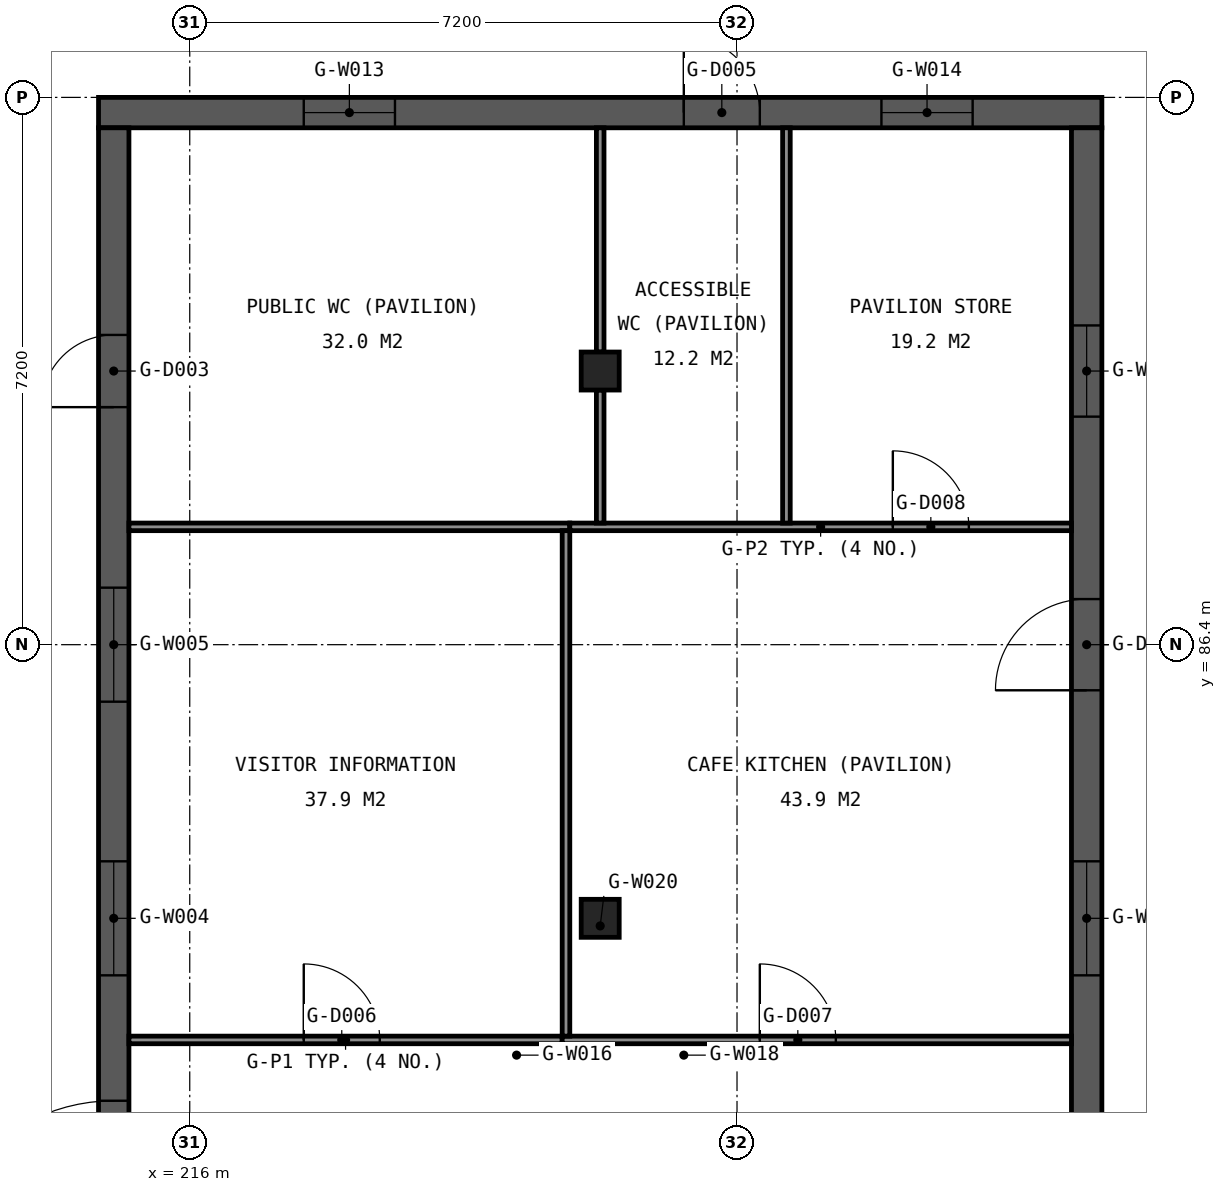
"""IFC4 building model, lengths in metres.
Left out: names, types, materials, properties, quantities, classifications, styles, units other than length and angle.
Written with IfcOpenShell. Run it as: python <this file> out.ifc"""

import sys

from ifc_helpers import new_model, si_unit, direction, frame, frame_2d, origin, origin_2d, place, context, subcontext, project, spatial, rectangle, extrude, element, fill, save


model = new_model("IFC4")
c1 = context("Model", 3, precision=1e-05, world=origin(), true_north=direction((0.0, 1.0)))
c2 = subcontext(c1, "Body", "Model", "MODEL_VIEW")
j1 = project(units=[si_unit("LENGTHUNIT", "METRE"), si_unit("PLANEANGLEUNIT", "RADIAN")], contexts=[c1])
p1 = place(None, origin())
s1 = spatial("IfcSite", under=j1, at=p1, CompositionType="ELEMENT")
p2 = place(p1, origin())
s2 = spatial("IfcBuilding", under=s1, at=p2, CompositionType="ELEMENT")
p3 = place(p2, frame((0.0, 0.0, 4.8)))
s3 = spatial("IfcBuildingStorey", under=s2, at=p3, CompositionType="ELEMENT", Elevation=4.8)
p4 = place(p3, frame((214.8, 93.4, -1.2), z_axis=(0.0, 0.0, 1.0), x_axis=(1.0, 0.0, 0.0)))
e1 = element("IfcWall", 1, at=p4, inside=s3, PredefinedType="SOLIDWALL", context=c2, shape_type="SweptSolid", body=[
    extrude(rectangle(XDim=13.2, YDim=0.4, at=frame_2d((6.6, 0.0))), origin(), (0.0, 0.0, 1.0), 7.2),
])
p5 = place(p4, frame((7.7, 0.0, 1.2)))
e2 = element("IfcOpeningElement", 2, at=p5, cuts=e1, PredefinedType="OPENING", context=c2, shape_type="SweptSolid", body=[
    extrude(rectangle(XDim=1.0, YDim=2.1, at=frame_2d((0.5, 1.05))), frame((0.0, 0.21, 0.0), z_axis=(0.0, -1.0, 0.0), x_axis=(1.0, 0.0, 0.0)), (0.0, 0.0, 1.0), 0.42),
])
p6 = place(p4, frame((2.7, 0.0, 2.7)))
e3 = element("IfcOpeningElement", 3, at=p6, cuts=e1, PredefinedType="OPENING", context=c2, shape_type="SweptSolid", body=[
    extrude(rectangle(XDim=1.2, YDim=1.2, at=frame_2d((0.6, 0.6))), frame((0.0, 0.21, 0.0), z_axis=(0.0, -1.0, 0.0), x_axis=(1.0, 0.0, 0.0)), (0.0, 0.0, 1.0), 0.42),
])
p7 = place(p4, frame((10.3, 0.0, 2.7)))
e4 = element("IfcOpeningElement", 4, at=p7, cuts=e1, PredefinedType="OPENING", context=c2, shape_type="SweptSolid", body=[
    extrude(rectangle(XDim=1.2, YDim=1.2, at=frame_2d((0.6, 0.6))), frame((0.0, 0.21, 0.0), z_axis=(0.0, -1.0, 0.0), x_axis=(1.0, 0.0, 0.0)), (0.0, 0.0, 1.0), 0.42),
])
p8 = place(p3, frame((215.0, 65.2, -1.2), z_axis=(0.0, 0.0, 1.0), x_axis=(0.0, 1.0, 0.0)))
e5 = element("IfcWall", 5, at=p8, inside=s3, PredefinedType="SOLIDWALL", context=c2, shape_type="SweptSolid", body=[
    extrude(rectangle(XDim=28.0, YDim=0.4, at=frame_2d((14.0, 0.0))), origin(), (0.0, 0.0, 1.0), 7.2),
])
p9 = place(p8, frame((12.8, 0.0, 1.2)))
e6 = element("IfcOpeningElement", 6, at=p9, cuts=e5, PredefinedType="OPENING", context=c2, shape_type="SweptSolid", body=[
    extrude(rectangle(XDim=2.4, YDim=3.0, at=frame_2d((1.2, 1.5))), frame((0.0, 0.21, 0.0), z_axis=(0.0, -1.0, 0.0), x_axis=(1.0, 0.0, 0.0)), (0.0, 0.0, 1.0), 0.42),
])
p10 = place(p8, frame((24.325, 0.0, 1.2)))
e7 = element("IfcOpeningElement", 7, at=p10, cuts=e5, PredefinedType="OPENING", context=c2, shape_type="SweptSolid", body=[
    extrude(rectangle(XDim=0.95, YDim=2.1, at=frame_2d((0.475, 1.05))), frame((0.0, 0.21, 0.0), z_axis=(0.0, -1.0, 0.0), x_axis=(1.0, 0.0, 0.0)), (0.0, 0.0, 1.0), 0.42),
])
p11 = place(p8, frame((2.45, 0.0, 2.1)))
e8 = element("IfcOpeningElement", 8, at=p11, cuts=e5, PredefinedType="OPENING", context=c2, shape_type="SweptSolid", body=[
    extrude(rectangle(XDim=1.5, YDim=3.3, at=frame_2d((0.75, 1.65))), frame((0.0, 0.21, 0.0), z_axis=(0.0, -1.0, 0.0), x_axis=(1.0, 0.0, 0.0)), (0.0, 0.0, 1.0), 0.42),
])
p12 = place(p8, frame((6.05, 0.0, 2.1)))
e9 = element("IfcOpeningElement", 9, at=p12, cuts=e5, PredefinedType="OPENING", context=c2, shape_type="SweptSolid", body=[
    extrude(rectangle(XDim=1.5, YDim=3.3, at=frame_2d((0.75, 1.65))), frame((0.0, 0.21, 0.0), z_axis=(0.0, -1.0, 0.0), x_axis=(1.0, 0.0, 0.0)), (0.0, 0.0, 1.0), 0.42),
])
p13 = place(p8, frame((9.65, 0.0, 2.1)))
e10 = element("IfcOpeningElement", 10, at=p13, cuts=e5, PredefinedType="OPENING", context=c2, shape_type="SweptSolid", body=[
    extrude(rectangle(XDim=1.5, YDim=3.3, at=frame_2d((0.75, 1.65))), frame((0.0, 0.21, 0.0), z_axis=(0.0, -1.0, 0.0), x_axis=(1.0, 0.0, 0.0)), (0.0, 0.0, 1.0), 0.42),
])
p14 = place(p8, frame((16.85, 0.0, 2.1)))
e11 = element("IfcOpeningElement", 11, at=p14, cuts=e5, PredefinedType="OPENING", context=c2, shape_type="SweptSolid", body=[
    extrude(rectangle(XDim=1.5, YDim=3.3, at=frame_2d((0.75, 1.65))), frame((0.0, 0.21, 0.0), z_axis=(0.0, -1.0, 0.0), x_axis=(1.0, 0.0, 0.0)), (0.0, 0.0, 1.0), 0.42),
])
p15 = place(p8, frame((20.45, 0.0, 2.1)))
e12 = element("IfcOpeningElement", 12, at=p15, cuts=e5, PredefinedType="OPENING", context=c2, shape_type="SweptSolid", body=[
    extrude(rectangle(XDim=1.5, YDim=3.3, at=frame_2d((0.75, 1.65))), frame((0.0, 0.21, 0.0), z_axis=(0.0, -1.0, 0.0), x_axis=(1.0, 0.0, 0.0)), (0.0, 0.0, 1.0), 0.42),
])
p16 = place(p3, frame((227.8, 65.2, -1.2), z_axis=(0.0, 0.0, 1.0), x_axis=(0.0, 1.0, 0.0)))
e13 = element("IfcWall", 13, at=p16, inside=s3, PredefinedType="SOLIDWALL", context=c2, shape_type="SweptSolid", body=[
    extrude(rectangle(XDim=28.0, YDim=0.4, at=frame_2d((14.0, 0.0))), origin(), (0.0, 0.0, 1.0), 7.2),
])
p17 = place(p16, frame((20.6, 0.0, 1.2)))
e14 = element("IfcOpeningElement", 14, at=p17, cuts=e13, PredefinedType="OPENING", context=c2, shape_type="SweptSolid", body=[
    extrude(rectangle(XDim=1.2, YDim=2.1, at=frame_2d((0.6, 1.05))), frame((0.0, 0.21, 0.0), z_axis=(0.0, -1.0, 0.0), x_axis=(1.0, 0.0, 0.0)), (0.0, 0.0, 1.0), 0.42),
])
p18 = place(p16, frame((2.45, 0.0, 2.1)))
e15 = element("IfcOpeningElement", 15, at=p18, cuts=e13, PredefinedType="OPENING", context=c2, shape_type="SweptSolid", body=[
    extrude(rectangle(XDim=1.5, YDim=3.3, at=frame_2d((0.75, 1.65))), frame((0.0, 0.21, 0.0), z_axis=(0.0, -1.0, 0.0), x_axis=(1.0, 0.0, 0.0)), (0.0, 0.0, 1.0), 0.42),
])
p19 = place(p16, frame((6.05, 0.0, 2.1)))
e16 = element("IfcOpeningElement", 16, at=p19, cuts=e13, PredefinedType="OPENING", context=c2, shape_type="SweptSolid", body=[
    extrude(rectangle(XDim=1.5, YDim=3.3, at=frame_2d((0.75, 1.65))), frame((0.0, 0.21, 0.0), z_axis=(0.0, -1.0, 0.0), x_axis=(1.0, 0.0, 0.0)), (0.0, 0.0, 1.0), 0.42),
])
p20 = place(p16, frame((9.65, 0.0, 2.1)))
e17 = element("IfcOpeningElement", 17, at=p20, cuts=e13, PredefinedType="OPENING", context=c2, shape_type="SweptSolid", body=[
    extrude(rectangle(XDim=1.5, YDim=3.3, at=frame_2d((0.75, 1.65))), frame((0.0, 0.21, 0.0), z_axis=(0.0, -1.0, 0.0), x_axis=(1.0, 0.0, 0.0)), (0.0, 0.0, 1.0), 0.42),
])
p21 = place(p16, frame((13.25, 0.0, 2.1)))
e18 = element("IfcOpeningElement", 18, at=p21, cuts=e13, PredefinedType="OPENING", context=c2, shape_type="SweptSolid", body=[
    extrude(rectangle(XDim=1.5, YDim=3.3, at=frame_2d((0.75, 1.65))), frame((0.0, 0.21, 0.0), z_axis=(0.0, -1.0, 0.0), x_axis=(1.0, 0.0, 0.0)), (0.0, 0.0, 1.0), 0.42),
])
p22 = place(p16, frame((16.85, 0.0, 2.1)))
e19 = element("IfcOpeningElement", 19, at=p22, cuts=e13, PredefinedType="OPENING", context=c2, shape_type="SweptSolid", body=[
    extrude(rectangle(XDim=1.5, YDim=3.3, at=frame_2d((0.75, 1.65))), frame((0.0, 0.21, 0.0), z_axis=(0.0, -1.0, 0.0), x_axis=(1.0, 0.0, 0.0)), (0.0, 0.0, 1.0), 0.42),
])
p23 = place(p16, frame((24.2, 0.0, 2.7)))
e20 = element("IfcOpeningElement", 20, at=p23, cuts=e13, PredefinedType="OPENING", context=c2, shape_type="SweptSolid", body=[
    extrude(rectangle(XDim=1.2, YDim=1.2, at=frame_2d((0.6, 0.6))), frame((0.0, 0.21, 0.0), z_axis=(0.0, -1.0, 0.0), x_axis=(1.0, 0.0, 0.0)), (0.0, 0.0, 1.0), 0.42),
])
for number, where, z_axis, x_axis in (
    (21, (221.4, 82.8, -1.2), (0.0, 0.0, 1.0), (1.0, 0.0, 0.0)),
    (22, (221.4, 90.0, -1.2), (0.0, 0.0, 1.0), (1.0, 0.0, 0.0)),
):
    element("IfcColumn", number, at=place(p3, frame(where, z_axis=z_axis, x_axis=x_axis)), inside=s3, PredefinedType="COLUMN", context=c2, shape_type="SweptSolid", body=[
        extrude(rectangle(XDim=0.5, YDim=0.5, at=origin_2d()), origin(), (0.0, 0.0, 1.0), 4.95),
    ])
for number, where, z_axis, x_axis in (
    (23, (220.5, 82.1, 4.97), (0.0, 0.0, 1.0), (1.0, 0.0, 0.0)),
    (24, (220.5, 87.9, 4.97), (0.0, 0.0, 1.0), (1.0, 0.0, 0.0)),
    (25, (222.3, 82.1, 4.97), (0.0, 0.0, 1.0), (1.0, 0.0, 0.0)),
    (26, (222.3, 87.9, 4.97), (0.0, 0.0, 1.0), (1.0, 0.0, 0.0)),
):
    element("IfcColumn", number, at=place(p3, frame(where, z_axis=z_axis, x_axis=x_axis)), inside=s3, PredefinedType="COLUMN", context=c2, shape_type="SweptSolid", body=[
        extrude(rectangle(XDim=0.3, YDim=0.3, at=origin_2d()), origin(), (0.0, 0.0, 1.0), 3.931),
    ])
p24 = place(p3, frame((220.3, 75.6, 9.321), z_axis=(0.0, 0.0, 1.0), x_axis=(0.0, 1.0, 0.0)))
e27 = element("IfcWall", 27, at=p24, inside=s3, PredefinedType="SOLIDWALL", context=c2, shape_type="SweptSolid", body=[
    extrude(rectangle(XDim=7.2, YDim=0.2, at=frame_2d((3.6, 0.0))), origin(), (0.0, 0.0, 1.0), 2.2),
])
p25 = place(p24, frame((0.3, 0.0, 0.35)))
e28 = element("IfcOpeningElement", 28, at=p25, cuts=e27, PredefinedType="OPENING", context=c2, shape_type="SweptSolid", body=[
    extrude(rectangle(XDim=3.0, YDim=1.6, at=frame_2d((1.5, 0.8))), frame((0.0, 0.11, 0.0), z_axis=(0.0, -1.0, 0.0), x_axis=(1.0, 0.0, 0.0)), (0.0, 0.0, 1.0), 0.22),
])
p26 = place(p24, frame((3.9, 0.0, 0.35)))
e29 = element("IfcOpeningElement", 29, at=p26, cuts=e27, PredefinedType="OPENING", context=c2, shape_type="SweptSolid", body=[
    extrude(rectangle(XDim=3.0, YDim=1.6, at=frame_2d((1.5, 0.8))), frame((0.0, 0.11, 0.0), z_axis=(0.0, -1.0, 0.0), x_axis=(1.0, 0.0, 0.0)), (0.0, 0.0, 1.0), 0.22),
])
p27 = place(p3, frame((222.5, 75.6, 9.321), z_axis=(0.0, 0.0, 1.0), x_axis=(0.0, 1.0, 0.0)))
e30 = element("IfcWall", 30, at=p27, inside=s3, PredefinedType="SOLIDWALL", context=c2, shape_type="SweptSolid", body=[
    extrude(rectangle(XDim=7.2, YDim=0.2, at=frame_2d((3.6, 0.0))), origin(), (0.0, 0.0, 1.0), 2.2),
])
p28 = place(p27, frame((0.3, 0.0, 0.35)))
e31 = element("IfcOpeningElement", 31, at=p28, cuts=e30, PredefinedType="OPENING", context=c2, shape_type="SweptSolid", body=[
    extrude(rectangle(XDim=3.0, YDim=1.6, at=frame_2d((1.5, 0.8))), frame((0.0, 0.11, 0.0), z_axis=(0.0, -1.0, 0.0), x_axis=(1.0, 0.0, 0.0)), (0.0, 0.0, 1.0), 0.22),
])
p29 = place(p27, frame((3.9, 0.0, 0.35)))
e32 = element("IfcOpeningElement", 32, at=p29, cuts=e30, PredefinedType="OPENING", context=c2, shape_type="SweptSolid", body=[
    extrude(rectangle(XDim=3.0, YDim=1.6, at=frame_2d((1.5, 0.8))), frame((0.0, 0.11, 0.0), z_axis=(0.0, -1.0, 0.0), x_axis=(1.0, 0.0, 0.0)), (0.0, 0.0, 1.0), 0.22),
])
p30 = place(p3, frame((220.4, 82.7, 9.321), z_axis=(0.0, 0.0, 1.0), x_axis=(1.0, 0.0, 0.0)))
e33 = element("IfcWall", 33, at=p30, inside=s3, PredefinedType="SOLIDWALL", context=c2, shape_type="SweptSolid", body=[
    extrude(rectangle(XDim=2.0, YDim=0.2, at=frame_2d((1.0, 0.0))), origin(), (0.0, 0.0, 1.0), 2.2),
])
p31 = place(p30, frame((0.4, 0.0, 0.35)))
e34 = element("IfcOpeningElement", 34, at=p31, cuts=e33, PredefinedType="OPENING", context=c2, shape_type="SweptSolid", body=[
    extrude(rectangle(XDim=1.2, YDim=1.6, at=frame_2d((0.6, 0.8))), frame((0.0, 0.11, 0.0), z_axis=(0.0, -1.0, 0.0), x_axis=(1.0, 0.0, 0.0)), (0.0, 0.0, 1.0), 0.22),
])
p32 = place(p3, frame((215.2, 81.2, 0.0), z_axis=(0.0, 0.0, 1.0), x_axis=(1.0, 0.0, 0.0)))
e35 = element("IfcWall", 35, at=p32, inside=s3, PredefinedType="PARTITIONING", context=c2, shape_type="SweptSolid", body=[
    extrude(rectangle(XDim=5.7, YDim=0.1, at=frame_2d((2.85, 0.0))), origin(), (0.0, 0.0, 1.0), 3.75),
])
p33 = place(p32, frame((2.3, 0.0, 0.0)))
e36 = element("IfcOpeningElement", 36, at=p33, cuts=e35, PredefinedType="OPENING", context=c2, shape_type="SweptSolid", body=[
    extrude(rectangle(XDim=1.0, YDim=2.1, at=frame_2d((0.5, 1.05))), frame((0.0, 0.06, 0.0), z_axis=(0.0, -1.0, 0.0), x_axis=(1.0, 0.0, 0.0)), (0.0, 0.0, 1.0), 0.12),
])
p34 = place(p3, frame((220.9, 81.2, 0.0), z_axis=(0.0, 0.0, 1.0), x_axis=(1.0, 0.0, 0.0)))
e37 = element("IfcWall", 37, at=p34, inside=s3, PredefinedType="PARTITIONING", context=c2, shape_type="SweptSolid", body=[
    extrude(rectangle(XDim=6.7, YDim=0.1, at=frame_2d((3.35, 0.0))), origin(), (0.0, 0.0, 1.0), 3.75),
])
p35 = place(p34, frame((2.6, 0.0, 0.0)))
e38 = element("IfcOpeningElement", 38, at=p35, cuts=e37, PredefinedType="OPENING", context=c2, shape_type="SweptSolid", body=[
    extrude(rectangle(XDim=1.0, YDim=2.1, at=frame_2d((0.5, 1.05))), frame((0.0, 0.06, 0.0), z_axis=(0.0, -1.0, 0.0), x_axis=(1.0, 0.0, 0.0)), (0.0, 0.0, 1.0), 0.12),
])
p36 = place(p3, frame((215.2, 87.95, 0.0), z_axis=(0.0, 0.0, 1.0), x_axis=(1.0, 0.0, 0.0)))
e39 = element("IfcWall", 39, at=p36, inside=s3, PredefinedType="PARTITIONING", context=c2, shape_type="SweptSolid", body=[
    extrude(rectangle(XDim=5.8, YDim=0.1, at=frame_2d((2.9, 0.0))), origin(), (0.0, 0.0, 1.0), 3.75),
])
p37 = place(p3, frame((221.0, 87.95, 0.0), z_axis=(0.0, 0.0, 1.0), x_axis=(1.0, 0.0, 0.0)))
e40 = element("IfcWall", 40, at=p37, inside=s3, PredefinedType="PARTITIONING", context=c2, shape_type="SweptSolid", body=[
    extrude(rectangle(XDim=6.6, YDim=0.1, at=frame_2d((3.3, 0.0))), origin(), (0.0, 0.0, 1.0), 3.75),
])
p38 = place(p37, frame((4.25, 0.0, 0.0)))
e41 = element("IfcOpeningElement", 41, at=p38, cuts=e40, PredefinedType="OPENING", context=c2, shape_type="SweptSolid", body=[
    extrude(rectangle(XDim=1.0, YDim=2.1, at=frame_2d((0.5, 1.05))), frame((0.0, 0.06, 0.0), z_axis=(0.0, -1.0, 0.0), x_axis=(1.0, 0.0, 0.0)), (0.0, 0.0, 1.0), 0.12),
])
p39 = place(p3, frame((220.95, 81.25, 0.0), z_axis=(0.0, 0.0, 1.0), x_axis=(0.0, 1.0, 0.0)))
e42 = element("IfcWall", 42, at=p39, inside=s3, PredefinedType="PARTITIONING", context=c2, shape_type="SweptSolid", body=[
    extrude(rectangle(XDim=6.65, YDim=0.1, at=frame_2d((3.325, 0.0))), origin(), (0.0, 0.0, 1.0), 3.75),
])
p40 = place(p3, frame((221.4, 88.0, 0.0), z_axis=(0.0, 0.0, 1.0), x_axis=(0.0, 1.0, 0.0)))
e43 = element("IfcWall", 43, at=p40, inside=s3, PredefinedType="PARTITIONING", context=c2, shape_type="SweptSolid", body=[
    extrude(rectangle(XDim=1.75, YDim=0.1, at=frame_2d((0.875, 0.0))), origin(), (0.0, 0.0, 1.0), 3.75),
])
p41 = place(p3, frame((221.4, 90.25, 0.0), z_axis=(0.0, 0.0, 1.0), x_axis=(0.0, 1.0, 0.0)))
e44 = element("IfcWall", 44, at=p41, inside=s3, PredefinedType="PARTITIONING", context=c2, shape_type="SweptSolid", body=[
    extrude(rectangle(XDim=2.95, YDim=0.1, at=frame_2d((1.475, 0.0))), origin(), (0.0, 0.0, 1.0), 3.75),
])
p42 = place(p3, frame((223.85, 88.0, 0.0), z_axis=(0.0, 0.0, 1.0), x_axis=(0.0, 1.0, 0.0)))
e45 = element("IfcWall", 45, at=p42, inside=s3, PredefinedType="PARTITIONING", context=c2, shape_type="SweptSolid", body=[
    extrude(rectangle(XDim=5.2, YDim=0.1, at=frame_2d((2.6, 0.0))), origin(), (0.0, 0.0, 1.0), 3.75),
])
p43 = place(p9, origin())
e46 = element("IfcDoor", 46, at=p43, inside=s3, OperationType="DOUBLE_DOOR_SINGLE_SWING", PredefinedType="DOOR", context=c2, shape_type="SweptSolid", body=[
    extrude(rectangle(XDim=2.4, YDim=3.0, at=frame_2d((1.2, 1.5))), frame((0.0, -0.15, 0.0), z_axis=(0.0, -1.0, 0.0), x_axis=(1.0, 0.0, 0.0)), (0.0, 0.0, 1.0), 0.05),
])
fill(e6, e46)
p44 = place(p10, origin())
e47 = element("IfcDoor", 47, at=p44, inside=s3, OperationType="SINGLE_SWING_LEFT", PredefinedType="DOOR", context=c2, shape_type="SweptSolid", body=[
    extrude(rectangle(XDim=0.95, YDim=2.1, at=frame_2d((0.475, 1.05))), frame((0.0, -0.15, 0.0), z_axis=(0.0, -1.0, 0.0), x_axis=(1.0, 0.0, 0.0)), (0.0, 0.0, 1.0), 0.05),
])
fill(e7, e47)
p45 = place(p17, origin())
e48 = element("IfcDoor", 48, at=p45, inside=s3, OperationType="SINGLE_SWING_LEFT", PredefinedType="DOOR", context=c2, shape_type="SweptSolid", body=[
    extrude(rectangle(XDim=1.2, YDim=2.1, at=frame_2d((0.6, 1.05))), frame((0.0, 0.2, 0.0), z_axis=(0.0, -1.0, 0.0), x_axis=(1.0, 0.0, 0.0)), (0.0, 0.0, 1.0), 0.05),
])
fill(e14, e48)
p46 = place(p5, origin())
e49 = element("IfcDoor", 49, at=p46, inside=s3, OperationType="SINGLE_SWING_LEFT", PredefinedType="DOOR", context=c2, shape_type="SweptSolid", body=[
    extrude(rectangle(XDim=1.0, YDim=2.1, at=frame_2d((0.5, 1.05))), frame((0.0, -0.15, 0.0), z_axis=(0.0, -1.0, 0.0), x_axis=(1.0, 0.0, 0.0)), (0.0, 0.0, 1.0), 0.05),
])
fill(e2, e49)
p47 = place(p14, origin())
e50 = element("IfcWindow", 50, at=p47, inside=s3, PartitioningType="SINGLE_PANEL", PredefinedType="WINDOW", context=c2, shape_type="SweptSolid", body=[
    extrude(rectangle(XDim=1.5, YDim=3.3, at=frame_2d((0.75, 1.65))), frame((0.0, -0.14, 0.0), z_axis=(0.0, -1.0, 0.0), x_axis=(1.0, 0.0, 0.0)), (0.0, 0.0, 1.0), 0.06),
])
fill(e11, e50)
p48 = place(p15, origin())
e51 = element("IfcWindow", 51, at=p48, inside=s3, PartitioningType="SINGLE_PANEL", PredefinedType="WINDOW", context=c2, shape_type="SweptSolid", body=[
    extrude(rectangle(XDim=1.5, YDim=3.3, at=frame_2d((0.75, 1.65))), frame((0.0, -0.14, 0.0), z_axis=(0.0, -1.0, 0.0), x_axis=(1.0, 0.0, 0.0)), (0.0, 0.0, 1.0), 0.06),
])
fill(e12, e51)
p49 = place(p22, origin())
e52 = element("IfcWindow", 52, at=p49, inside=s3, PartitioningType="SINGLE_PANEL", PredefinedType="WINDOW", context=c2, shape_type="SweptSolid", body=[
    extrude(rectangle(XDim=1.5, YDim=3.3, at=frame_2d((0.75, 1.65))), frame((0.0, 0.2, 0.0), z_axis=(0.0, -1.0, 0.0), x_axis=(1.0, 0.0, 0.0)), (0.0, 0.0, 1.0), 0.06),
])
fill(e19, e52)
p50 = place(p23, origin())
e53 = element("IfcWindow", 53, at=p50, inside=s3, PartitioningType="SINGLE_PANEL", PredefinedType="WINDOW", context=c2, shape_type="SweptSolid", body=[
    extrude(rectangle(XDim=1.2, YDim=1.2, at=frame_2d((0.6, 0.6))), frame((0.0, 0.2, 0.0), z_axis=(0.0, -1.0, 0.0), x_axis=(1.0, 0.0, 0.0)), (0.0, 0.0, 1.0), 0.06),
])
fill(e20, e53)
p51 = place(p6, origin())
e54 = element("IfcWindow", 54, at=p51, inside=s3, PartitioningType="SINGLE_PANEL", PredefinedType="WINDOW", context=c2, shape_type="SweptSolid", body=[
    extrude(rectangle(XDim=1.2, YDim=1.2, at=frame_2d((0.6, 0.6))), frame((0.0, -0.14, 0.0), z_axis=(0.0, -1.0, 0.0), x_axis=(1.0, 0.0, 0.0)), (0.0, 0.0, 1.0), 0.06),
])
fill(e3, e54)
p52 = place(p7, origin())
e55 = element("IfcWindow", 55, at=p52, inside=s3, PartitioningType="SINGLE_PANEL", PredefinedType="WINDOW", context=c2, shape_type="SweptSolid", body=[
    extrude(rectangle(XDim=1.2, YDim=1.2, at=frame_2d((0.6, 0.6))), frame((0.0, -0.14, 0.0), z_axis=(0.0, -1.0, 0.0), x_axis=(1.0, 0.0, 0.0)), (0.0, 0.0, 1.0), 0.06),
])
fill(e4, e55)
p53 = place(p26, origin())
e56 = element("IfcWindow", 56, at=p53, inside=s3, PartitioningType="SINGLE_PANEL", PredefinedType="WINDOW", context=c2, shape_type="SweptSolid", body=[
    extrude(rectangle(XDim=3.0, YDim=1.6, at=frame_2d((1.5, 0.8))), frame((0.0, 0.03, 0.0), z_axis=(0.0, -1.0, 0.0), x_axis=(1.0, 0.0, 0.0)), (0.0, 0.0, 1.0), 0.06),
])
fill(e29, e56)
p54 = place(p29, origin())
e57 = element("IfcWindow", 57, at=p54, inside=s3, PartitioningType="SINGLE_PANEL", PredefinedType="WINDOW", context=c2, shape_type="SweptSolid", body=[
    extrude(rectangle(XDim=3.0, YDim=1.6, at=frame_2d((1.5, 0.8))), frame((0.0, 0.03, 0.0), z_axis=(0.0, -1.0, 0.0), x_axis=(1.0, 0.0, 0.0)), (0.0, 0.0, 1.0), 0.06),
])
fill(e32, e57)
p55 = place(p31, origin())
e58 = element("IfcWindow", 58, at=p55, inside=s3, PartitioningType="SINGLE_PANEL", PredefinedType="WINDOW", context=c2, shape_type="SweptSolid", body=[
    extrude(rectangle(XDim=1.2, YDim=1.6, at=frame_2d((0.6, 0.8))), frame((0.0, 0.03, 0.0), z_axis=(0.0, -1.0, 0.0), x_axis=(1.0, 0.0, 0.0)), (0.0, 0.0, 1.0), 0.06),
])
fill(e34, e58)
p56 = place(p33, origin())
e59 = element("IfcDoor", 59, at=p56, inside=s3, OperationType="SINGLE_SWING_LEFT", PredefinedType="DOOR", context=c2, shape_type="SweptSolid", body=[
    extrude(rectangle(XDim=1.0, YDim=2.1, at=frame_2d((0.5, 1.05))), frame((0.0, 0.025, 0.0), z_axis=(0.0, -1.0, 0.0), x_axis=(1.0, 0.0, 0.0)), (0.0, 0.0, 1.0), 0.05),
])
fill(e36, e59)
p57 = place(p35, origin())
e60 = element("IfcDoor", 60, at=p57, inside=s3, OperationType="SINGLE_SWING_LEFT", PredefinedType="DOOR", context=c2, shape_type="SweptSolid", body=[
    extrude(rectangle(XDim=1.0, YDim=2.1, at=frame_2d((0.5, 1.05))), frame((0.0, 0.025, 0.0), z_axis=(0.0, -1.0, 0.0), x_axis=(1.0, 0.0, 0.0)), (0.0, 0.0, 1.0), 0.05),
])
fill(e38, e60)
p58 = place(p38, origin())
e61 = element("IfcDoor", 61, at=p58, inside=s3, OperationType="SINGLE_SWING_LEFT", PredefinedType="DOOR", context=c2, shape_type="SweptSolid", body=[
    extrude(rectangle(XDim=1.0, YDim=2.1, at=frame_2d((0.5, 1.05))), frame((0.0, 0.025, 0.0), z_axis=(0.0, -1.0, 0.0), x_axis=(1.0, 0.0, 0.0)), (0.0, 0.0, 1.0), 0.05),
])
fill(e41, e61)
save(model, sys.argv[1])
